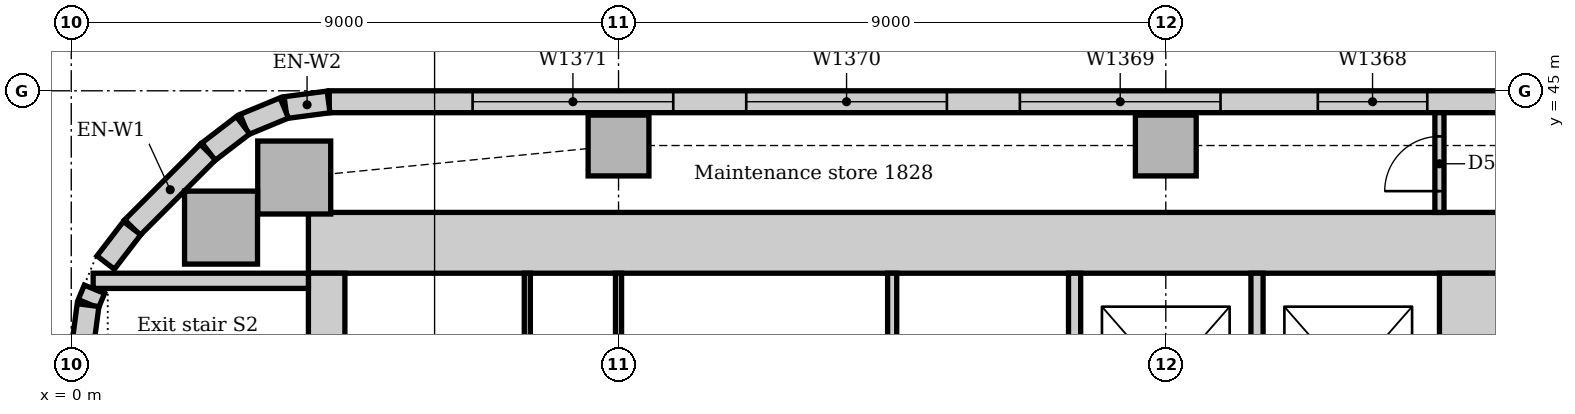
"""IFC4 building model, lengths in metres.
Left out: names, types, materials, properties, quantities, classifications, styles, units other than length and angle.
Written with IfcOpenShell. Run it as: python <this file> out.ifc"""

import sys

from ifc_helpers import new_model, si_unit, direction, frame, frame_2d, origin, origin_2d, place, context, subcontext, project, spatial, rectangle, extrude, element, fill, save


model = new_model("IFC4")
c1 = context("Model", 3, precision=1e-05, world=origin(), true_north=direction((0.0, 1.0)))
c2 = subcontext(c1, "Body", "Model", "MODEL_VIEW")
j1 = project(units=[si_unit("LENGTHUNIT", "METRE"), si_unit("PLANEANGLEUNIT", "RADIAN")], contexts=[c1])
p1 = place(None, origin())
s1 = spatial("IfcSite", under=j1, at=p1, CompositionType="ELEMENT")
p2 = place(p1, origin())
s2 = spatial("IfcBuilding", under=s1, at=p2, CompositionType="ELEMENT")
p3 = place(p2, frame((0.0, 0.0, 79.0)))
s3 = spatial("IfcBuildingStorey", under=s2, at=p3, CompositionType="ELEMENT", Elevation=79.0)
p4 = place(p3, frame((23.5, 42.5, 0.0), z_axis=(0.0, 0.0, 1.0), x_axis=(-1.0, 0.0, 0.0)))
e1 = element("IfcWall", 1, at=p4, inside=s3, PredefinedType="SOLIDWALL", context=c2, shape_type="SweptSolid", body=[
    extrude(rectangle(XDim=19.6, YDim=1.0, at=frame_2d((9.8, 0.0))), origin(), (0.0, 0.0, 1.0), 4.0),
])
p5 = place(p3, frame((23.0, 31.5, 0.0), z_axis=(0.0, 0.0, 1.0), x_axis=(0.0, 1.0, 0.0)))
e2 = element("IfcWall", 2, at=p5, inside=s3, PredefinedType="SOLIDWALL", context=c2, shape_type="SweptSolid", body=[
    extrude(rectangle(XDim=10.5, YDim=1.0, at=frame_2d((5.25, 0.0))), origin(), (0.0, 0.0, 1.0), 4.0),
])
p6 = place(p5, frame((3.15, 0.0, 0.0)))
e3 = element("IfcOpeningElement", 3, at=p6, cuts=e2, PredefinedType="OPENING", context=c2, shape_type="SweptSolid", body=[
    extrude(rectangle(XDim=1.0, YDim=2.1, at=frame_2d((0.5, 1.05))), frame((0.0, 0.51, 0.0), z_axis=(0.0, -1.0, 0.0), x_axis=(1.0, 0.0, 0.0)), (0.0, 0.0, 1.0), 1.02),
])
p7 = place(p5, frame((5.2, 0.0, 0.0)))
e4 = element("IfcOpeningElement", 4, at=p7, cuts=e2, PredefinedType="OPENING", context=c2, shape_type="SweptSolid", body=[
    extrude(rectangle(XDim=1.0, YDim=2.1, at=frame_2d((0.5, 1.05))), frame((0.0, 0.51, 0.0), z_axis=(0.0, -1.0, 0.0), x_axis=(1.0, 0.0, 0.0)), (0.0, 0.0, 1.0), 1.02),
])
p8 = place(p3, frame((4.2, 42.0, 0.0), z_axis=(0.0, 0.0, 1.0), x_axis=(0.0, -1.0, 0.0)))
e5 = element("IfcWall", 5, at=p8, inside=s3, PredefinedType="SOLIDWALL", context=c2, shape_type="SweptSolid", body=[
    extrude(rectangle(XDim=10.5, YDim=0.6, at=frame_2d((5.25, 0.0))), origin(), (0.0, 0.0, 1.0), 4.0),
])
p9 = place(p8, frame((5.3, 0.0, 0.0)))
e6 = element("IfcOpeningElement", 6, at=p9, cuts=e5, PredefinedType="OPENING", context=c2, shape_type="SweptSolid", body=[
    extrude(rectangle(XDim=1.0, YDim=2.1, at=frame_2d((0.5, 1.05))), frame((0.0, 0.31, 0.0), z_axis=(0.0, -1.0, 0.0), x_axis=(1.0, 0.0, 0.0)), (0.0, 0.0, 1.0), 0.62),
])
p10 = place(p3, frame((3.9, 41.875, 0.0), z_axis=(0.0, 0.0, 1.0), x_axis=(-1.0, 0.0, 0.0)))
e7 = element("IfcWall", 7, at=p10, inside=s3, PredefinedType="SOLIDWALL", context=c2, shape_type="SweptSolid", body=[
    extrude(rectangle(XDim=3.54, YDim=0.25, at=frame_2d((1.77, 0.0))), origin(), (0.0, 0.0, 1.0), 4.0),
])
for number, where, z_axis, x_axis in (
    (8, (3.667, 43.574, 0.0), (0.0, 0.0, 1.0), (1.0, 0.0, 0.0)),
    (9, (2.463, 42.75, 0.0), (0.0, 0.0, 1.0), (1.0, 0.0, 0.0)),
):
    element("IfcColumn", number, at=place(p3, frame(where, z_axis=z_axis, x_axis=x_axis)), inside=s3, PredefinedType="COLUMN", context=c2, shape_type="SweptSolid", body=[
        extrude(rectangle(XDim=1.2, YDim=1.2, at=origin_2d()), origin(), (0.0, 0.0, 1.0), 3.85),
    ])
for number, where, z_axis, x_axis in (
    (10, (9.0, 44.1, 0.0), (0.0, 0.0, 1.0), (1.0, 0.0, 0.0)),
    (11, (18.0, 44.1, 0.0), (0.0, 0.0, 1.0), (1.0, 0.0, 0.0)),
):
    element("IfcColumn", number, at=place(p3, frame(where, z_axis=z_axis, x_axis=x_axis)), inside=s3, PredefinedType="COLUMN", context=c2, shape_type="SweptSolid", body=[
        extrude(rectangle(XDim=1.0, YDim=1.0, at=origin_2d()), origin(), (0.0, 0.0, 1.0), 3.85),
    ])
p11 = place(p3, frame((48.257, 44.82, 0.0), z_axis=(0.0, 0.0, 1.0), x_axis=(-1.0, 0.0, 0.0)))
e12 = element("IfcWall", 12, at=p11, inside=s3, PredefinedType="STANDARD", context=c2, shape_type="SweptSolid", body=[
    extrude(rectangle(XDim=44.015, YDim=0.36, at=frame_2d((22.007, 0.0))), origin(), (0.0, 0.0, 1.0), 3.85),
])
p12 = place(p11, frame((2.057, 0.0, 0.9)))
e13 = element("IfcOpeningElement", 13, at=p12, cuts=e12, PredefinedType="OPENING", context=c2, shape_type="SweptSolid", body=[
    extrude(rectangle(XDim=3.3, YDim=1.6, at=frame_2d((1.65, 0.8))), frame((0.0, 0.19, 0.0), z_axis=(0.0, -1.0, 0.0), x_axis=(1.0, 0.0, 0.0)), (0.0, 0.0, 1.0), 0.38),
])
p13 = place(p11, frame((6.857, 0.0, 0.9)))
e14 = element("IfcOpeningElement", 14, at=p13, cuts=e12, PredefinedType="OPENING", context=c2, shape_type="SweptSolid", body=[
    extrude(rectangle(XDim=3.3, YDim=1.6, at=frame_2d((1.65, 0.8))), frame((0.0, 0.19, 0.0), z_axis=(0.0, -1.0, 0.0), x_axis=(1.0, 0.0, 0.0)), (0.0, 0.0, 1.0), 0.38),
])
p14 = place(p11, frame((11.357, 0.0, 0.9)))
e15 = element("IfcOpeningElement", 15, at=p14, cuts=e12, PredefinedType="OPENING", context=c2, shape_type="SweptSolid", body=[
    extrude(rectangle(XDim=3.3, YDim=1.6, at=frame_2d((1.65, 0.8))), frame((0.0, 0.19, 0.0), z_axis=(0.0, -1.0, 0.0), x_axis=(1.0, 0.0, 0.0)), (0.0, 0.0, 1.0), 0.38),
])
p15 = place(p11, frame((15.857, 0.0, 0.9)))
e16 = element("IfcOpeningElement", 16, at=p15, cuts=e12, PredefinedType="OPENING", context=c2, shape_type="SweptSolid", body=[
    extrude(rectangle(XDim=3.3, YDim=1.6, at=frame_2d((1.65, 0.8))), frame((0.0, 0.19, 0.0), z_axis=(0.0, -1.0, 0.0), x_axis=(1.0, 0.0, 0.0)), (0.0, 0.0, 1.0), 0.38),
])
p16 = place(p11, frame((20.357, 0.0, 0.9)))
e17 = element("IfcOpeningElement", 17, at=p16, cuts=e12, PredefinedType="OPENING", context=c2, shape_type="SweptSolid", body=[
    extrude(rectangle(XDim=3.3, YDim=1.6, at=frame_2d((1.65, 0.8))), frame((0.0, 0.19, 0.0), z_axis=(0.0, -1.0, 0.0), x_axis=(1.0, 0.0, 0.0)), (0.0, 0.0, 1.0), 0.38),
])
p17 = place(p11, frame((25.957, 0.0, 0.9)))
e18 = element("IfcOpeningElement", 18, at=p17, cuts=e12, PredefinedType="OPENING", context=c2, shape_type="SweptSolid", body=[
    extrude(rectangle(XDim=1.8, YDim=1.6, at=frame_2d((0.9, 0.8))), frame((0.0, 0.19, 0.0), z_axis=(0.0, -1.0, 0.0), x_axis=(1.0, 0.0, 0.0)), (0.0, 0.0, 1.0), 0.38),
])
p18 = place(p11, frame((29.357, 0.0, 0.9)))
e19 = element("IfcOpeningElement", 19, at=p18, cuts=e12, PredefinedType="OPENING", context=c2, shape_type="SweptSolid", body=[
    extrude(rectangle(XDim=3.3, YDim=1.6, at=frame_2d((1.65, 0.8))), frame((0.0, 0.19, 0.0), z_axis=(0.0, -1.0, 0.0), x_axis=(1.0, 0.0, 0.0)), (0.0, 0.0, 1.0), 0.38),
])
p19 = place(p11, frame((33.857, 0.0, 0.9)))
e20 = element("IfcOpeningElement", 20, at=p19, cuts=e12, PredefinedType="OPENING", context=c2, shape_type="SweptSolid", body=[
    extrude(rectangle(XDim=3.3, YDim=1.6, at=frame_2d((1.65, 0.8))), frame((0.0, 0.19, 0.0), z_axis=(0.0, -1.0, 0.0), x_axis=(1.0, 0.0, 0.0)), (0.0, 0.0, 1.0), 0.38),
])
p20 = place(p11, frame((38.357, 0.0, 0.9)))
e21 = element("IfcOpeningElement", 21, at=p20, cuts=e12, PredefinedType="OPENING", context=c2, shape_type="SweptSolid", body=[
    extrude(rectangle(XDim=3.3, YDim=1.6, at=frame_2d((1.65, 0.8))), frame((0.0, 0.19, 0.0), z_axis=(0.0, -1.0, 0.0), x_axis=(1.0, 0.0, 0.0)), (0.0, 0.0, 1.0), 0.38),
])
p21 = place(p3, frame((2.249, 43.994, 0.0), z_axis=(0.0, 0.0, 1.0), x_axis=(-0.707106781187, -0.707106781187, 0.0)))
e22 = element("IfcWall", 22, at=p21, inside=s3, PredefinedType="STANDARD", context=c2, shape_type="SweptSolid", body=[
    extrude(rectangle(XDim=1.757, YDim=0.36, at=frame_2d((0.879, 0.0))), origin(), (0.0, 0.0, 1.0), 3.85),
])
for number, where, z_axis, x_axis in (
    (23, (4.231, 44.817, 0.0), (0.0, 0.0, 1.0), (-0.991, -0.131, 0.0)),
    (24, (3.503, 44.718, 0.0), (0.0, 0.0, 1.0), (-0.924, -0.383, 0.0)),
):
    element("IfcWall", number, at=place(p3, frame(where, z_axis=z_axis, x_axis=x_axis)), inside=s3, PredefinedType="STANDARD", context=c2, shape_type="SweptSolid", body=[
        extrude(rectangle(XDim=0.713, YDim=0.36, at=frame_2d((0.356, 0.0))), origin(), (0.0, 0.0, 1.0), 3.85),
    ])
for number, where, z_axis, x_axis in (
    (25, (2.825, 44.434, 0.0), (0.0, 0.0, 1.0), (-0.793, -0.609, 0.0)),
    (26, (1.0, 42.741, 0.0), (0.0, 0.0, 1.0), (-0.609, -0.793, 0.0)),
):
    element("IfcWall", number, at=place(p3, frame(where, z_axis=z_axis, x_axis=x_axis)), inside=s3, PredefinedType="STANDARD", context=c2, shape_type="SweptSolid", body=[
        extrude(rectangle(XDim=0.713, YDim=0.36, at=frame_2d((0.357, 0.0))), origin(), (0.0, 0.0, 1.0), 3.85),
    ])
p22 = place(p3, frame((0.381, 41.736, 0.0), z_axis=(0.0, 0.0, 1.0), x_axis=(-0.382773360986, -0.923842277729, 0.0)))
e27 = element("IfcWall", 27, at=p22, inside=s3, PredefinedType="STANDARD", context=c2, shape_type="SweptSolid", body=[
    extrude(rectangle(XDim=0.258, YDim=0.36, at=frame_2d((0.129, 0.0))), origin(), (0.0, 0.0, 1.0), 3.85),
])
p23 = place(p3, frame((0.276, 41.476, 0.0), z_axis=(0.0, 0.0, 1.0), x_axis=(-0.13055608231, -0.99144092581, 0.0)))
e28 = element("IfcWall", 28, at=p23, inside=s3, PredefinedType="STANDARD", context=c2, shape_type="SweptSolid", body=[
    extrude(rectangle(XDim=0.713, YDim=0.36, at=frame_2d((0.356, 0.0))), origin(), (0.0, 0.0, 1.0), 3.85),
])
for number, where, z_axis, x_axis in (
    (29, (16.5, 38.6, 0.0), (0.0, 0.0, 1.0), (0.0, 1.0, 0.0)),
    (30, (19.5, 38.6, 0.0), (0.0, 0.0, 1.0), (0.0, 1.0, 0.0)),
):
    element("IfcWall", number, at=place(p3, frame(where, z_axis=z_axis, x_axis=x_axis)), inside=s3, PredefinedType="PARTITIONING", context=c2, shape_type="SweptSolid", body=[
        extrude(rectangle(XDim=3.4, YDim=0.2, at=frame_2d((1.7, 0.0))), origin(), (0.0, 0.0, 1.0), 3.85),
    ])
p24 = place(p3, frame((22.5, 43.0, 0.0), z_axis=(0.0, 0.0, 1.0), x_axis=(0.0, 1.0, 0.0)))
e31 = element("IfcWall", 31, at=p24, inside=s3, PredefinedType="PARTITIONING", context=c2, shape_type="SweptSolid", body=[
    extrude(rectangle(XDim=1.64, YDim=0.15, at=frame_2d((0.82, 0.0))), origin(), (0.0, 0.0, 1.0), 3.85),
])
p25 = place(p24, frame((0.35, 0.0, 0.0)))
e32 = element("IfcOpeningElement", 32, at=p25, cuts=e31, PredefinedType="OPENING", context=c2, shape_type="SweptSolid", body=[
    extrude(rectangle(XDim=0.9, YDim=2.1, at=frame_2d((0.45, 1.05))), frame((0.0, 0.085, 0.0), z_axis=(0.0, -1.0, 0.0), x_axis=(1.0, 0.0, 0.0)), (0.0, 0.0, 1.0), 0.17),
])
p26 = place(p3, frame((13.5, 38.575, 0.0), z_axis=(0.0, 0.0, 1.0), x_axis=(0.0, 1.0, 0.0)))
e33 = element("IfcWall", 33, at=p26, inside=s3, PredefinedType="PARTITIONING", context=c2, shape_type="SweptSolid", body=[
    extrude(rectangle(XDim=3.425, YDim=0.15, at=frame_2d((1.712, 0.0))), origin(), (0.0, 0.0, 1.0), 3.85),
])
for number, where, z_axis, x_axis in (
    (34, (7.5, 38.575, 0.0), (0.0, 0.0, 1.0), (0.0, 1.0, 0.0)),
    (35, (9.0, 38.575, 0.0), (0.0, 0.0, 1.0), (0.0, 1.0, 0.0)),
):
    element("IfcWall", number, at=place(p3, frame(where, z_axis=z_axis, x_axis=x_axis)), inside=s3, PredefinedType="PARTITIONING", context=c2, shape_type="SweptSolid", body=[
        extrude(rectangle(XDim=3.425, YDim=0.1, at=frame_2d((1.712, 0.0))), origin(), (0.0, 0.0, 1.0), 3.85),
    ])
p27 = place(p17, origin())
e36 = element("IfcWindow", 36, at=p27, inside=s3, PartitioningType="SINGLE_PANEL", PredefinedType="WINDOW", context=c2, shape_type="SweptSolid", body=[
    extrude(rectangle(XDim=1.8, YDim=1.6, at=frame_2d((0.9, 0.8))), frame((0.0, 0.13, 0.0), z_axis=(0.0, -1.0, 0.0), x_axis=(1.0, 0.0, 0.0)), (0.0, 0.0, 1.0), 0.06),
])
fill(e18, e36)
p28 = place(p18, origin())
e37 = element("IfcWindow", 37, at=p28, inside=s3, PartitioningType="SINGLE_PANEL", PredefinedType="WINDOW", context=c2, shape_type="SweptSolid", body=[
    extrude(rectangle(XDim=3.3, YDim=1.6, at=frame_2d((1.65, 0.8))), frame((0.0, 0.13, 0.0), z_axis=(0.0, -1.0, 0.0), x_axis=(1.0, 0.0, 0.0)), (0.0, 0.0, 1.0), 0.06),
])
fill(e19, e37)
p29 = place(p19, origin())
e38 = element("IfcWindow", 38, at=p29, inside=s3, PartitioningType="SINGLE_PANEL", PredefinedType="WINDOW", context=c2, shape_type="SweptSolid", body=[
    extrude(rectangle(XDim=3.3, YDim=1.6, at=frame_2d((1.65, 0.8))), frame((0.0, 0.13, 0.0), z_axis=(0.0, -1.0, 0.0), x_axis=(1.0, 0.0, 0.0)), (0.0, 0.0, 1.0), 0.06),
])
fill(e20, e38)
p30 = place(p20, origin())
e39 = element("IfcWindow", 39, at=p30, inside=s3, PartitioningType="SINGLE_PANEL", PredefinedType="WINDOW", context=c2, shape_type="SweptSolid", body=[
    extrude(rectangle(XDim=3.3, YDim=1.6, at=frame_2d((1.65, 0.8))), frame((0.0, 0.13, 0.0), z_axis=(0.0, -1.0, 0.0), x_axis=(1.0, 0.0, 0.0)), (0.0, 0.0, 1.0), 0.06),
])
fill(e21, e39)
p31 = place(p25, origin())
e40 = element("IfcDoor", 40, at=p31, inside=s3, OperationType="SINGLE_SWING_LEFT", PredefinedType="DOOR", context=c2, shape_type="SweptSolid", body=[
    extrude(rectangle(XDim=0.9, YDim=2.1, at=frame_2d((0.45, 1.05))), frame((0.0, 0.025, 0.0), z_axis=(0.0, -1.0, 0.0), x_axis=(1.0, 0.0, 0.0)), (0.0, 0.0, 1.0), 0.05),
])
fill(e32, e40)
save(model, sys.argv[1])
